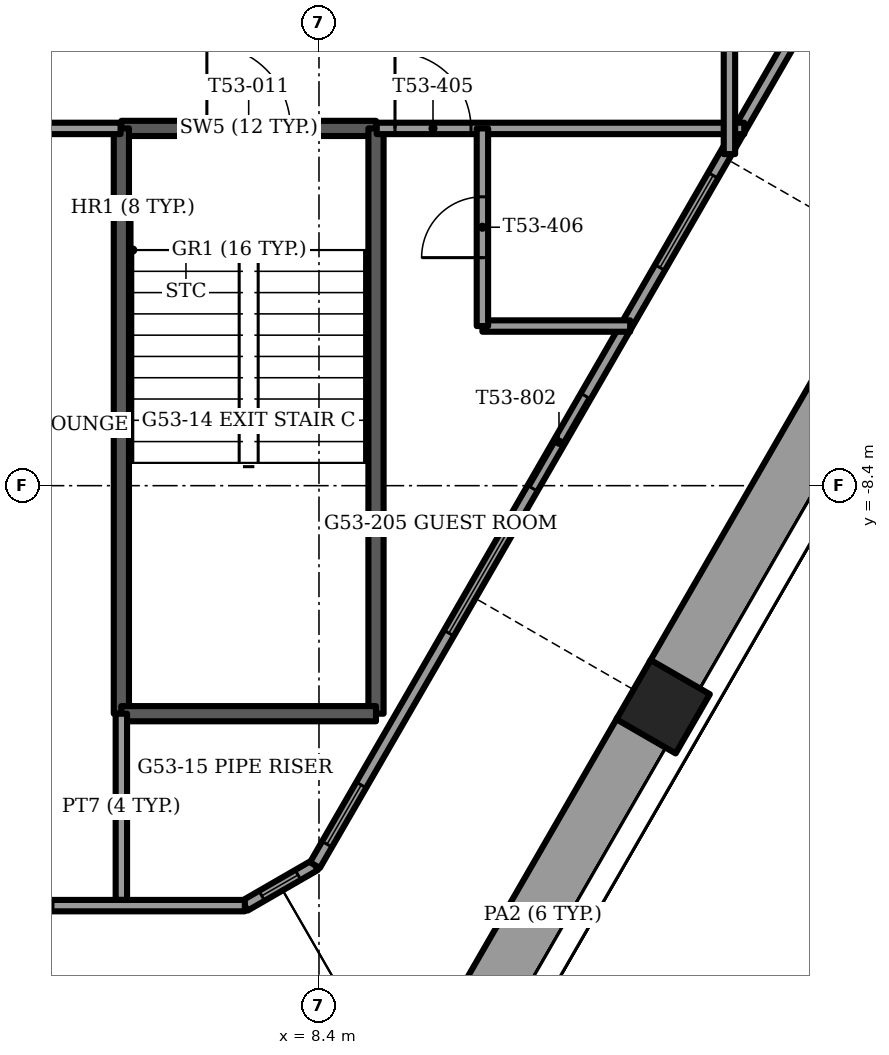
"""IFC4 building model, lengths in metres.
Left out: names, types, materials, properties, quantities, classifications, styles, units other than length and angle.
Written with IfcOpenShell. Run it as: python <this file> out.ifc"""

import sys

from ifc_helpers import new_model, si_unit, direction, frame, frame_2d, origin, origin_2d, place, context, subcontext, project, spatial, rectangle, extrude, element, fill, save


model = new_model("IFC4")
c1 = context("Model", 3, precision=1e-05, world=origin(), true_north=direction((0.0, 1.0)))
c2 = subcontext(c1, "Body", "Model", "MODEL_VIEW")
j1 = project(units=[si_unit("LENGTHUNIT", "METRE"), si_unit("PLANEANGLEUNIT", "RADIAN")], contexts=[c1])
p1 = place(None, origin())
s1 = spatial("IfcSite", under=j1, at=p1, CompositionType="ELEMENT")
p2 = place(p1, origin())
s2 = spatial("IfcBuilding", under=s1, at=p2, CompositionType="ELEMENT")
p3 = place(p2, frame((0.0, 0.0, 214.5)))
s3 = spatial("IfcBuildingStorey", under=s2, at=p3, CompositionType="ELEMENT", Elevation=214.5)
p4 = place(p3, frame((12.928, -11.308, -1.2), z_axis=(0.0, 0.0, 1.0), x_axis=(-0.5, -0.866025403784, 0.0)))
e1 = element("IfcColumn", 1, at=p4, inside=s3, PredefinedType="COLUMN", context=c2, shape_type="SweptSolid", body=[
    extrude(rectangle(XDim=0.9, YDim=0.9, at=origin_2d()), origin(), (0.0, 0.0, 1.0), 3.75),
])
p5 = place(p3, frame((9.972, -16.428, 0.0), z_axis=(0.0, 0.0, 1.0), x_axis=(0.50000722722, 0.866021231107, 0.0)))
e2 = element("IfcWall", 2, at=p5, inside=s3, PredefinedType="PARAPET", context=c2, shape_type="SweptSolid", body=[
    extrude(rectangle(XDim=5.492, YDim=0.9, at=frame_2d((2.746, 0.0))), origin(), (0.0, 0.0, 1.0), 1.1),
])
p6 = place(p3, frame((13.138, -10.945, 0.0), z_axis=(0.0, 0.0, 1.0), x_axis=(0.500015433515, 0.866016493057, 0.0)))
e3 = element("IfcWall", 3, at=p6, inside=s3, PredefinedType="PARAPET", context=c2, shape_type="SweptSolid", body=[
    extrude(rectangle(XDim=5.819, YDim=0.9, at=frame_2d((2.909, 0.0))), origin(), (0.0, 0.0, 1.0), 1.1),
])
p7 = place(p3, frame((-7.425, -13.925, 0.0), z_axis=(0.0, 0.0, 1.0), x_axis=(1.0, 0.0, 0.0)))
e4 = element("IfcWall", 4, at=p7, inside=s3, PredefinedType="SOLIDWALL", context=c2, shape_type="SweptSolid", body=[
    extrude(rectangle(XDim=14.85, YDim=0.15, at=frame_2d((7.425, 0.0))), origin(), (0.0, 0.0, 1.0), 3.45),
])
p8 = place(p7, frame((1.975, 0.0, 0.15)))
e5 = element("IfcOpeningElement", 5, at=p8, cuts=e4, PredefinedType="OPENING", context=c2, shape_type="SweptSolid", body=[
    extrude(rectangle(XDim=0.9, YDim=2.85, at=frame_2d((0.45, 1.425))), frame((0.0, 0.075, 0.0), z_axis=(0.0, -1.0, 0.0), x_axis=(1.0, 0.0, 0.0)), (0.0, 0.0, 1.0), 0.15),
])
p9 = place(p7, frame((3.625, 0.0, 0.15)))
e6 = element("IfcOpeningElement", 6, at=p9, cuts=e4, PredefinedType="OPENING", context=c2, shape_type="SweptSolid", body=[
    extrude(rectangle(XDim=1.4, YDim=2.85, at=frame_2d((0.7, 1.425))), frame((0.0, 0.075, 0.0), z_axis=(0.0, -1.0, 0.0), x_axis=(1.0, 0.0, 0.0)), (0.0, 0.0, 1.0), 0.15),
])
p10 = place(p7, frame((5.625, 0.0, 0.15)))
e7 = element("IfcOpeningElement", 7, at=p10, cuts=e4, PredefinedType="OPENING", context=c2, shape_type="SweptSolid", body=[
    extrude(rectangle(XDim=1.5, YDim=2.85, at=frame_2d((0.75, 1.425))), frame((0.0, 0.075, 0.0), z_axis=(0.0, -1.0, 0.0), x_axis=(1.0, 0.0, 0.0)), (0.0, 0.0, 1.0), 0.15),
])
p11 = place(p7, frame((7.775, 0.0, 0.15)))
e8 = element("IfcOpeningElement", 8, at=p11, cuts=e4, PredefinedType="OPENING", context=c2, shape_type="SweptSolid", body=[
    extrude(rectangle(XDim=1.4, YDim=2.85, at=frame_2d((0.7, 1.425))), frame((0.0, 0.075, 0.0), z_axis=(0.0, -1.0, 0.0), x_axis=(1.0, 0.0, 0.0)), (0.0, 0.0, 1.0), 0.15),
])
p12 = place(p7, frame((9.875, 0.0, 0.15)))
e9 = element("IfcOpeningElement", 9, at=p12, cuts=e4, PredefinedType="OPENING", context=c2, shape_type="SweptSolid", body=[
    extrude(rectangle(XDim=0.9, YDim=2.85, at=frame_2d((0.45, 1.425))), frame((0.0, 0.075, 0.0), z_axis=(0.0, -1.0, 0.0), x_axis=(1.0, 0.0, 0.0)), (0.0, 0.0, 1.0), 0.15),
])
p13 = place(p7, frame((10.925, 0.0, 0.0)))
e10 = element("IfcOpeningElement", 10, at=p13, cuts=e4, PredefinedType="OPENING", context=c2, shape_type="SweptSolid", body=[
    extrude(rectangle(XDim=1.4, YDim=2.4, at=frame_2d((0.7, 1.2))), frame((0.0, 0.075, 0.0), z_axis=(0.0, -1.0, 0.0), x_axis=(1.0, 0.0, 0.0)), (0.0, 0.0, 1.0), 0.15),
])
p14 = place(p3, frame((8.347, -13.393, 0.0), z_axis=(0.0, 0.0, 1.0), x_axis=(0.500000919504, 0.866024872908, 0.0)))
e11 = element("IfcWall", 11, at=p14, inside=s3, PredefinedType="SOLIDWALL", context=c2, shape_type="SweptSolid", body=[
    extrude(rectangle(XDim=14.85, YDim=0.15, at=frame_2d((7.425, 0.0))), origin(), (0.0, 0.0, 1.0), 3.45),
])
p15 = place(p14, frame((3.525, 0.0, 0.15)))
e12 = element("IfcOpeningElement", 12, at=p15, cuts=e11, PredefinedType="OPENING", context=c2, shape_type="SweptSolid", body=[
    extrude(rectangle(XDim=1.5, YDim=2.85, at=frame_2d((0.75, 1.425))), frame((0.0, 0.075, 0.0), z_axis=(0.0, -1.0, 0.0), x_axis=(1.0, 0.0, 0.0)), (0.0, 0.0, 1.0), 0.15),
])
p16 = place(p14, frame((5.725, 0.0, 0.0)))
e13 = element("IfcOpeningElement", 13, at=p16, cuts=e11, PredefinedType="OPENING", context=c2, shape_type="SweptSolid", body=[
    extrude(rectangle(XDim=1.4, YDim=2.4, at=frame_2d((0.7, 1.2))), frame((0.0, 0.075, 0.0), z_axis=(0.0, -1.0, 0.0), x_axis=(1.0, 0.0, 0.0)), (0.0, 0.0, 1.0), 0.15),
])
p17 = place(p14, frame((9.078, 0.0, 0.15)))
e14 = element("IfcOpeningElement", 14, at=p17, cuts=e11, PredefinedType="OPENING", context=c2, shape_type="SweptSolid", body=[
    extrude(rectangle(XDim=1.4, YDim=2.85, at=frame_2d((0.7, 1.425))), frame((0.0, 0.075, 0.0), z_axis=(0.0, -1.0, 0.0), x_axis=(1.0, 0.0, 0.0)), (0.0, 0.0, 1.0), 0.15),
])
p18 = place(p14, frame((0.318, 0.0, 0.15)))
e15 = element("IfcOpeningElement", 15, at=p18, cuts=e11, PredefinedType="OPENING", context=c2, shape_type="SweptSolid", body=[
    extrude(rectangle(XDim=0.9, YDim=2.73, at=frame_2d((0.45, 1.365))), frame((0.0, 0.075, 0.0), z_axis=(0.0, -1.0, 0.0), x_axis=(1.0, 0.0, 0.0)), (0.0, 0.0, 1.0), 0.15),
])
p19 = place(p14, frame((12.537, 0.0, 0.15)))
e16 = element("IfcOpeningElement", 16, at=p19, cuts=e11, PredefinedType="OPENING", context=c2, shape_type="SweptSolid", body=[
    extrude(rectangle(XDim=1.5, YDim=2.73, at=frame_2d((0.75, 1.365))), frame((0.0, 0.075, 0.0), z_axis=(0.0, -1.0, 0.0), x_axis=(1.0, 0.0, 0.0)), (0.0, 0.0, 1.0), 0.15),
])
p20 = place(p3, frame((7.425, -13.925, 0.0), z_axis=(0.0, 0.0, 1.0), x_axis=(0.865990848561, 0.500059846627, 0.0)))
e17 = element("IfcWall", 17, at=p20, inside=s3, PredefinedType="SOLIDWALL", context=c2, shape_type="SweptSolid", body=[
    extrude(rectangle(XDim=1.065, YDim=0.15, at=frame_2d((0.532, 0.0))), origin(), (0.0, 0.0, 1.0), 3.45),
])
p21 = place(p20, frame((0.258, 0.0, 0.15)))
e18 = element("IfcOpeningElement", 18, at=p21, cuts=e17, PredefinedType="OPENING", context=c2, shape_type="SweptSolid", body=[
    extrude(rectangle(XDim=0.55, YDim=2.85, at=frame_2d((0.275, 1.425))), frame((0.0, 0.075, 0.0), z_axis=(0.0, -1.0, 0.0), x_axis=(1.0, 0.0, 0.0)), (0.0, 0.0, 1.0), 0.15),
])
p22 = place(p3, frame((5.8, -3.7, -0.3), z_axis=(0.0, 0.0, 1.0), x_axis=(1.0, 0.0, 0.0)))
e19 = element("IfcWall", 19, at=p22, inside=s3, PredefinedType="SOLIDWALL", context=c2, shape_type="SweptSolid", body=[
    extrude(rectangle(XDim=3.35, YDim=0.2, at=frame_2d((1.675, 0.0))), origin(), (0.0, 0.0, 1.0), 3.75),
])
p23 = place(p22, frame((1.125, 0.0, 0.0)))
e20 = element("IfcOpeningElement", 20, at=p23, cuts=e19, PredefinedType="OPENING", context=c2, shape_type="SweptSolid", body=[
    extrude(rectangle(XDim=1.1, YDim=2.1, at=frame_2d((0.55, 1.05))), frame((0.0, 0.1, 0.0), z_axis=(0.0, -1.0, 0.0), x_axis=(1.0, 0.0, 0.0)), (0.0, 0.0, 1.0), 0.2),
])
for number, where, z_axis, x_axis in (
    (21, (5.8, -3.7, -0.3), (0.0, 0.0, 1.0), (0.0, -1.0, 0.0)),
    (22, (9.15, -3.7, -0.3), (0.0, 0.0, 1.0), (0.0, -1.0, 0.0)),
):
    element("IfcWall", number, at=place(p3, frame(where, z_axis=z_axis, x_axis=x_axis)), inside=s3, PredefinedType="SOLIDWALL", context=c2, shape_type="SweptSolid", body=[
        extrude(rectangle(XDim=7.7, YDim=0.2, at=frame_2d((3.85, 0.0))), origin(), (0.0, 0.0, 1.0), 3.75),
    ])
p24 = place(p3, frame((5.8, -11.4, -0.3), z_axis=(0.0, 0.0, 1.0), x_axis=(1.0, 0.0, 0.0)))
e23 = element("IfcWall", 23, at=p24, inside=s3, PredefinedType="SOLIDWALL", context=c2, shape_type="SweptSolid", body=[
    extrude(rectangle(XDim=3.35, YDim=0.2, at=frame_2d((1.675, 0.0))), origin(), (0.0, 0.0, 1.0), 3.75),
])
p25 = place(p3, frame((5.8, -11.4, 0.0), z_axis=(0.0, 0.0, 1.0), x_axis=(0.0, -1.0, 0.0)))
e24 = element("IfcWall", 24, at=p25, inside=s3, PredefinedType="PARTITIONING", context=c2, shape_type="SweptSolid", body=[
    extrude(rectangle(XDim=2.45, YDim=0.15, at=frame_2d((1.225, 0.0))), origin(), (0.0, 0.0, 1.0), 3.45),
])
p26 = place(p3, frame((10.55, -6.3, 0.0), z_axis=(0.0, 0.0, 1.0), x_axis=(1.0, 0.0, 0.0)))
e25 = element("IfcWall", 25, at=p26, inside=s3, PredefinedType="PARTITIONING", context=c2, shape_type="SweptSolid", body=[
    extrude(rectangle(XDim=1.944, YDim=0.15, at=frame_2d((0.972, 0.0))), origin(), (0.0, 0.0, 1.0), 3.45),
])
p27 = place(p3, frame((-5.79, -3.7, 0.0), z_axis=(0.0, 0.0, 1.0), x_axis=(1.0, 0.0, 0.0)))
e26 = element("IfcWall", 26, at=p27, inside=s3, PredefinedType="PARTITIONING", context=c2, shape_type="SweptSolid", body=[
    extrude(rectangle(XDim=11.58, YDim=0.15, at=frame_2d((5.79, 0.0))), origin(), (0.0, 0.0, 1.0), 3.45),
])
p28 = place(p27, frame((4.24, 0.0, 0.0)))
e27 = element("IfcOpeningElement", 27, at=p28, cuts=e26, PredefinedType="OPENING", context=c2, shape_type="SweptSolid", body=[
    extrude(rectangle(XDim=1.0, YDim=2.1, at=frame_2d((0.5, 1.05))), frame((0.0, 0.075, 0.0), z_axis=(0.0, -1.0, 0.0), x_axis=(1.0, 0.0, 0.0)), (0.0, 0.0, 1.0), 0.15),
])
p29 = place(p27, frame((0.29, 0.0, 0.0)))
e28 = element("IfcOpeningElement", 28, at=p29, cuts=e26, PredefinedType="OPENING", context=c2, shape_type="SweptSolid", body=[
    extrude(rectangle(XDim=1.0, YDim=2.1, at=frame_2d((0.5, 1.05))), frame((0.0, 0.075, 0.0), z_axis=(0.0, -1.0, 0.0), x_axis=(1.0, 0.0, 0.0)), (0.0, 0.0, 1.0), 0.15),
])
p30 = place(p27, frame((9.24, 0.0, 0.0)))
e29 = element("IfcOpeningElement", 29, at=p30, cuts=e26, PredefinedType="OPENING", context=c2, shape_type="SweptSolid", body=[
    extrude(rectangle(XDim=1.0, YDim=2.1, at=frame_2d((0.5, 1.05))), frame((0.0, 0.075, 0.0), z_axis=(0.0, -1.0, 0.0), x_axis=(1.0, 0.0, 0.0)), (0.0, 0.0, 1.0), 0.15),
])
p31 = place(p3, frame((9.16, -3.7, 0.0), z_axis=(0.0, 0.0, 1.0), x_axis=(1.0, 0.0, 0.0)))
e30 = element("IfcWall", 30, at=p31, inside=s3, PredefinedType="PARTITIONING", context=c2, shape_type="SweptSolid", body=[
    extrude(rectangle(XDim=4.835, YDim=0.15, at=frame_2d((2.417, 0.0))), origin(), (0.0, 0.0, 1.0), 3.45),
])
p32 = place(p31, frame((0.24, 0.0, 0.0)))
e31 = element("IfcOpeningElement", 31, at=p32, cuts=e30, PredefinedType="OPENING", context=c2, shape_type="SweptSolid", body=[
    extrude(rectangle(XDim=1.0, YDim=2.1, at=frame_2d((0.5, 1.05))), frame((0.0, 0.075, 0.0), z_axis=(0.0, -1.0, 0.0), x_axis=(1.0, 0.0, 0.0)), (0.0, 0.0, 1.0), 0.15),
])
p33 = place(p3, frame((13.8, -4.038, 0.0), z_axis=(0.0, 0.0, 1.0), x_axis=(0.0, 1.0, 0.0)))
e32 = element("IfcWall", 32, at=p33, inside=s3, PredefinedType="PARTITIONING", context=c2, shape_type="SweptSolid", body=[
    extrude(rectangle(XDim=2.338, YDim=0.15, at=frame_2d((1.169, 0.0))), origin(), (0.0, 0.0, 1.0), 3.45),
])
p34 = place(p3, frame((10.55, -6.3, 0.0), z_axis=(0.0, 0.0, 1.0), x_axis=(0.0, 1.0, 0.0)))
e33 = element("IfcWall", 33, at=p34, inside=s3, PredefinedType="PARTITIONING", context=c2, shape_type="SweptSolid", body=[
    extrude(rectangle(XDim=2.6, YDim=0.15, at=frame_2d((1.3, 0.0))), origin(), (0.0, 0.0, 1.0), 3.45),
])
p35 = place(p34, frame((0.9, 0.0, 0.0)))
e34 = element("IfcOpeningElement", 34, at=p35, cuts=e33, PredefinedType="OPENING", context=c2, shape_type="SweptSolid", body=[
    extrude(rectangle(XDim=0.8, YDim=2.1, at=frame_2d((0.4, 1.05))), frame((0.0, 0.075, 0.0), z_axis=(0.0, -1.0, 0.0), x_axis=(1.0, 0.0, 0.0)), (0.0, 0.0, 1.0), 0.15),
])
p36 = place(p15, origin())
e35 = element("IfcWindow", 35, at=p36, inside=s3, PartitioningType="SINGLE_PANEL", PredefinedType="WINDOW", context=c2, shape_type="SweptSolid", body=[
    extrude(rectangle(XDim=1.5, YDim=2.85, at=frame_2d((0.75, 1.425))), frame((0.0, 0.03, 0.0), z_axis=(0.0, -1.0, 0.0), x_axis=(1.0, 0.0, 0.0)), (0.0, 0.0, 1.0), 0.06),
])
fill(e12, e35)
p37 = place(p16, origin())
e36 = element("IfcDoor", 36, at=p37, inside=s3, OperationType="SLIDING_TO_LEFT", PredefinedType="DOOR", context=c2, shape_type="SweptSolid", body=[
    extrude(rectangle(XDim=1.4, YDim=2.4, at=frame_2d((0.7, 1.2))), frame((0.0, 0.025, 0.0), z_axis=(0.0, -1.0, 0.0), x_axis=(1.0, 0.0, 0.0)), (0.0, 0.0, 1.0), 0.05),
])
fill(e13, e36)
p38 = place(p17, origin())
e37 = element("IfcWindow", 37, at=p38, inside=s3, PartitioningType="SINGLE_PANEL", PredefinedType="WINDOW", context=c2, shape_type="SweptSolid", body=[
    extrude(rectangle(XDim=1.4, YDim=2.85, at=frame_2d((0.7, 1.425))), frame((0.0, 0.03, 0.0), z_axis=(0.0, -1.0, 0.0), x_axis=(1.0, 0.0, 0.0)), (0.0, 0.0, 1.0), 0.06),
])
fill(e14, e37)
p39 = place(p18, origin())
e38 = element("IfcWindow", 38, at=p39, inside=s3, PartitioningType="SINGLE_PANEL", PredefinedType="WINDOW", context=c2, shape_type="SweptSolid", body=[
    extrude(rectangle(XDim=0.9, YDim=2.73, at=frame_2d((0.45, 1.365))), frame((0.0, 0.03, 0.0), z_axis=(0.0, -1.0, 0.0), x_axis=(1.0, 0.0, 0.0)), (0.0, 0.0, 1.0), 0.06),
])
fill(e15, e38)
p40 = place(p21, origin())
e39 = element("IfcWindow", 39, at=p40, inside=s3, PartitioningType="SINGLE_PANEL", PredefinedType="WINDOW", context=c2, shape_type="SweptSolid", body=[
    extrude(rectangle(XDim=0.55, YDim=2.85, at=frame_2d((0.275, 1.425))), frame((0.0, 0.03, 0.0), z_axis=(0.0, -1.0, 0.0), x_axis=(1.0, 0.0, 0.0)), (0.0, 0.0, 1.0), 0.06),
])
fill(e18, e39)
p41 = place(p23, origin())
e40 = element("IfcDoor", 40, at=p41, inside=s3, OperationType="SINGLE_SWING_LEFT", PredefinedType="DOOR", context=c2, shape_type="SweptSolid", body=[
    extrude(rectangle(XDim=1.1, YDim=2.1, at=frame_2d((0.55, 1.05))), frame((0.0, 0.025, 0.0), z_axis=(0.0, -1.0, 0.0), x_axis=(1.0, 0.0, 0.0)), (0.0, 0.0, 1.0), 0.05),
])
fill(e20, e40)
p42 = place(p32, origin())
e41 = element("IfcDoor", 41, at=p42, inside=s3, OperationType="SINGLE_SWING_LEFT", PredefinedType="DOOR", context=c2, shape_type="SweptSolid", body=[
    extrude(rectangle(XDim=1.0, YDim=2.1, at=frame_2d((0.5, 1.05))), frame((0.0, 0.025, 0.0), z_axis=(0.0, -1.0, 0.0), x_axis=(1.0, 0.0, 0.0)), (0.0, 0.0, 1.0), 0.05),
])
fill(e31, e41)
p43 = place(p35, origin())
e42 = element("IfcDoor", 42, at=p43, inside=s3, OperationType="SINGLE_SWING_RIGHT", PredefinedType="DOOR", context=c2, shape_type="SweptSolid", body=[
    extrude(rectangle(XDim=0.8, YDim=2.1, at=frame_2d((0.4, 1.05))), frame((0.0, 0.025, 0.0), z_axis=(0.0, -1.0, 0.0), x_axis=(1.0, 0.0, 0.0)), (0.0, 0.0, 1.0), 0.05),
])
fill(e34, e42)
save(model, sys.argv[1])
